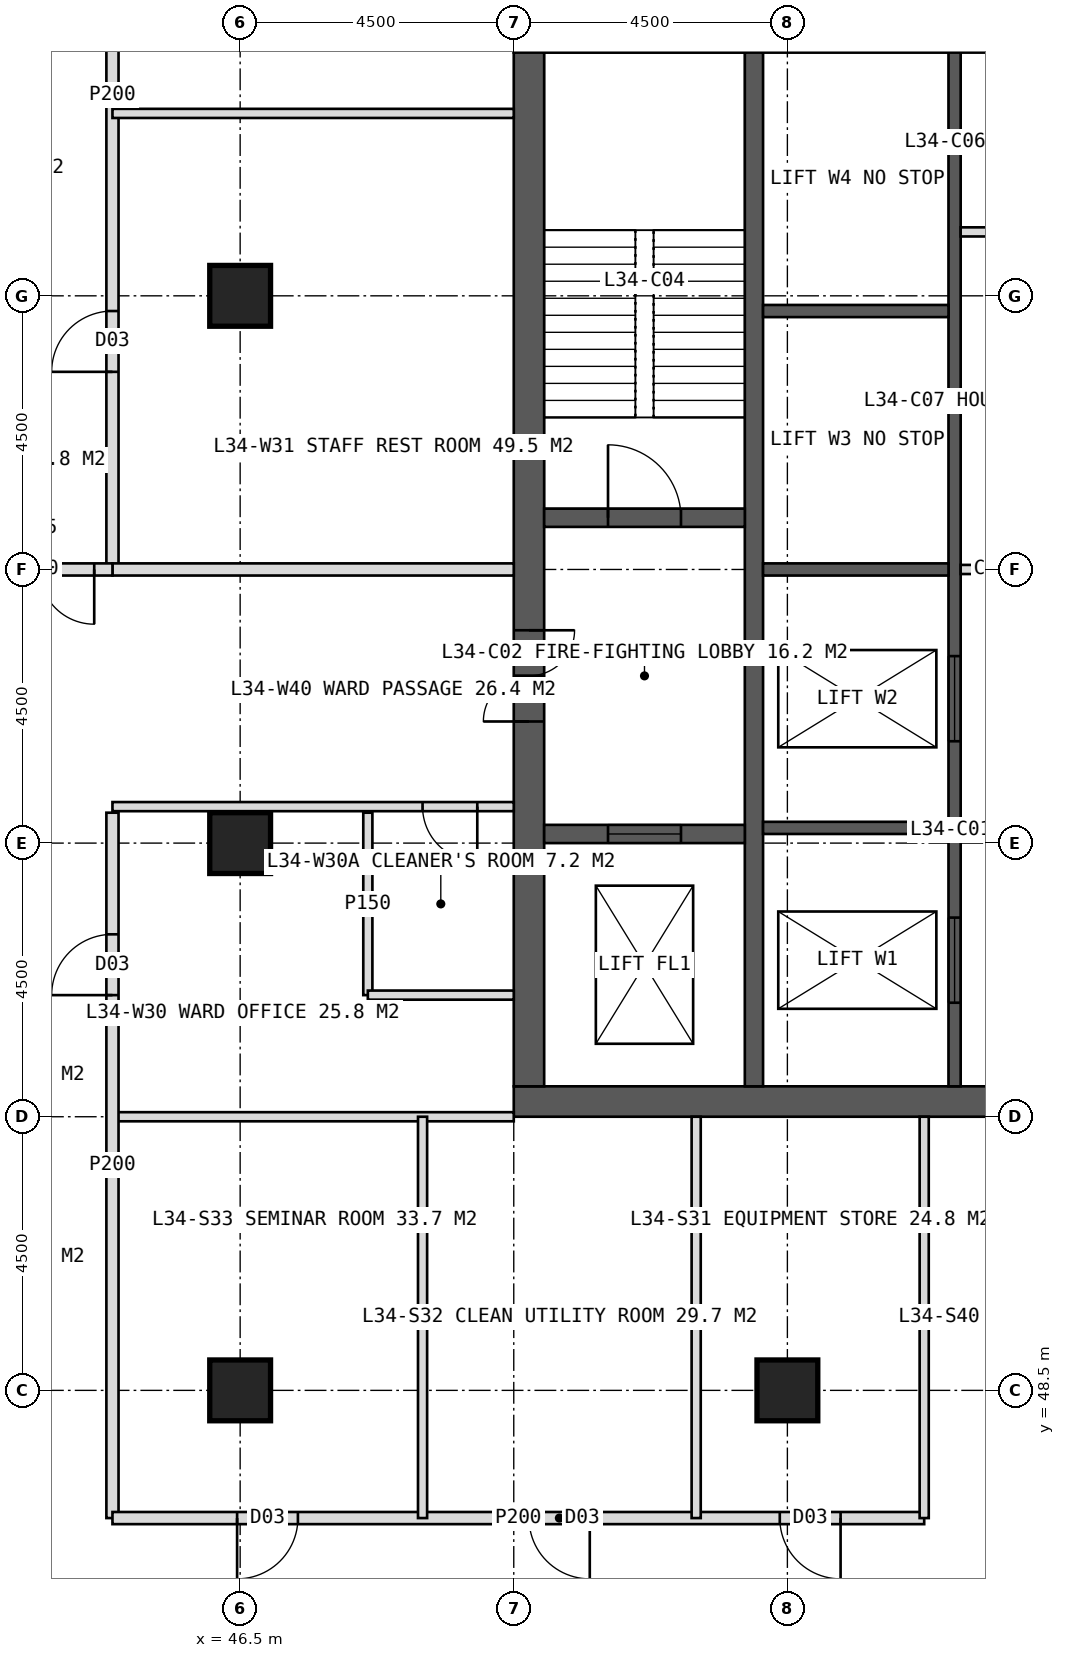
"""IFC4 building model, lengths in metres.
Left out: names, types, materials, properties, quantities, classifications, styles, units other than length and angle.
Written with IfcOpenShell. Run it as: python <this file> out.ifc"""

import sys

from ifc_helpers import new_model, si_unit, direction, frame, frame_2d, origin, origin_2d, place, context, subcontext, project, spatial, rectangle, hollow_rectangle, extrude, element, fill, save


model = new_model("IFC4")
c1 = context("Model", 3, precision=1e-05, world=origin(), true_north=direction((0.0, 1.0)))
c2 = subcontext(c1, "Body", "Model", "MODEL_VIEW")
j1 = project(units=[si_unit("LENGTHUNIT", "METRE"), si_unit("PLANEANGLEUNIT", "RADIAN")], contexts=[c1])
p1 = place(None, origin())
s1 = spatial("IfcSite", under=j1, at=p1, CompositionType="ELEMENT")
p2 = place(p1, origin())
s2 = spatial("IfcBuilding", under=s1, at=p2, CompositionType="ELEMENT")
p3 = place(p2, frame((0.0, 0.0, 144.0)))
s3 = spatial("IfcBuildingStorey", under=s2, at=p3, CompositionType="ELEMENT", Elevation=144.0)
p4 = place(p3, frame((51.0, 53.25, 0.0), z_axis=(0.0, 0.0, 1.0), x_axis=(1.0, 0.0, 0.0)))
e1 = element("IfcWall", 1, at=p4, inside=s3, PredefinedType="SHEAR", context=c2, shape_type="SweptSolid", body=[
    extrude(rectangle(XDim=18.0, YDim=0.5, at=frame_2d((9.0, 0.0))), origin(), (0.0, 0.0, 1.0), 4.0),
])
p5 = place(p4, frame((8.1, 0.0, 0.0)))
e2 = element("IfcOpeningElement", 2, at=p5, cuts=e1, PredefinedType="OPENING", context=c2, shape_type="SweptSolid", body=[
    extrude(rectangle(XDim=1.8, YDim=2.2, at=frame_2d((0.9, 1.1))), frame((0.0, 0.26, 0.0), z_axis=(0.0, -1.0, 0.0), x_axis=(1.0, 0.0, 0.0)), (0.0, 0.0, 1.0), 0.52),
])
p6 = place(p3, frame((51.25, 53.5, 0.0), z_axis=(0.0, 0.0, 1.0), x_axis=(0.0, 1.0, 0.0)))
e3 = element("IfcWall", 3, at=p6, inside=s3, PredefinedType="SHEAR", context=c2, shape_type="SweptSolid", body=[
    extrude(rectangle(XDim=17.0, YDim=0.5, at=frame_2d((8.5, 0.0))), origin(), (0.0, 0.0, 1.0), 4.0),
])
p7 = place(p6, frame((6.0, 0.0, 0.0)))
e4 = element("IfcOpeningElement", 4, at=p7, cuts=e3, PredefinedType="OPENING", context=c2, shape_type="SweptSolid", body=[
    extrude(rectangle(XDim=1.5, YDim=2.2, at=frame_2d((0.75, 1.1))), frame((0.0, 0.26, 0.0), z_axis=(0.0, -1.0, 0.0), x_axis=(1.0, 0.0, 0.0)), (0.0, 0.0, 1.0), 0.52),
])
p8 = place(p3, frame((54.95, 53.5, 0.0), z_axis=(0.0, 0.0, 1.0), x_axis=(0.0, 1.0, 0.0)))
e5 = element("IfcWall", 5, at=p8, inside=s3, PredefinedType="SHEAR", context=c2, shape_type="SweptSolid", body=[
    extrude(rectangle(XDim=17.0, YDim=0.3, at=frame_2d((8.5, 0.0))), origin(), (0.0, 0.0, 1.0), 4.0),
])
p9 = place(p3, frame((58.25, 53.5, 0.0), z_axis=(0.0, 0.0, 1.0), x_axis=(0.0, 1.0, 0.0)))
e6 = element("IfcWall", 6, at=p9, inside=s3, PredefinedType="SHEAR", context=c2, shape_type="SweptSolid", body=[
    extrude(rectangle(XDim=17.0, YDim=0.2, at=frame_2d((8.5, 0.0))), origin(), (0.0, 0.0, 1.0), 4.0),
])
p10 = place(p9, frame((1.375, 0.0, 0.0)))
e7 = element("IfcOpeningElement", 7, at=p10, cuts=e6, PredefinedType="OPENING", context=c2, shape_type="SweptSolid", body=[
    extrude(rectangle(XDim=1.4, YDim=2.2, at=frame_2d((0.7, 1.1))), frame((0.0, 0.11, 0.0), z_axis=(0.0, -1.0, 0.0), x_axis=(1.0, 0.0, 0.0)), (0.0, 0.0, 1.0), 0.22),
])
p11 = place(p9, frame((5.675, 0.0, 0.0)))
e8 = element("IfcOpeningElement", 8, at=p11, cuts=e6, PredefinedType="OPENING", context=c2, shape_type="SweptSolid", body=[
    extrude(rectangle(XDim=1.4, YDim=2.2, at=frame_2d((0.7, 1.1))), frame((0.0, 0.11, 0.0), z_axis=(0.0, -1.0, 0.0), x_axis=(1.0, 0.0, 0.0)), (0.0, 0.0, 1.0), 0.22),
])
for number, where, z_axis, x_axis in (
    (9, (55.1, 57.75, 0.0), (0.0, 0.0, 1.0), (1.0, 0.0, 0.0)),
    (10, (55.1, 62.0, 0.0), (0.0, 0.0, 1.0), (1.0, 0.0, 0.0)),
    (11, (55.1, 66.25, 0.0), (0.0, 0.0, 1.0), (1.0, 0.0, 0.0)),
):
    element("IfcWall", number, at=place(p3, frame(where, z_axis=z_axis, x_axis=x_axis)), inside=s3, PredefinedType="SHEAR", context=c2, shape_type="SweptSolid", body=[
        extrude(rectangle(XDim=3.05, YDim=0.2, at=frame_2d((1.525, 0.0))), origin(), (0.0, 0.0, 1.0), 4.0),
    ])
p12 = place(p3, frame((51.5, 62.85, 0.0), z_axis=(0.0, 0.0, 1.0), x_axis=(1.0, 0.0, 0.0)))
e12 = element("IfcWall", 12, at=p12, inside=s3, PredefinedType="SHEAR", context=c2, shape_type="SweptSolid", body=[
    extrude(rectangle(XDim=3.3, YDim=0.3, at=frame_2d((1.65, 0.0))), origin(), (0.0, 0.0, 1.0), 4.0),
])
p13 = place(p12, frame((1.05, 0.0, 0.0)))
e13 = element("IfcOpeningElement", 13, at=p13, cuts=e12, PredefinedType="OPENING", context=c2, shape_type="SweptSolid", body=[
    extrude(rectangle(XDim=1.2, YDim=2.1, at=frame_2d((0.6, 1.05))), frame((0.0, 0.16, 0.0), z_axis=(0.0, -1.0, 0.0), x_axis=(1.0, 0.0, 0.0)), (0.0, 0.0, 1.0), 0.32),
])
p14 = place(p3, frame((51.5, 57.65, 0.0), z_axis=(0.0, 0.0, 1.0), x_axis=(1.0, 0.0, 0.0)))
e14 = element("IfcWall", 14, at=p14, inside=s3, PredefinedType="SHEAR", context=c2, shape_type="SweptSolid", body=[
    extrude(rectangle(XDim=3.3, YDim=0.3, at=frame_2d((1.65, 0.0))), origin(), (0.0, 0.0, 1.0), 4.0),
])
p15 = place(p14, frame((1.05, 0.0, 0.0)))
e15 = element("IfcOpeningElement", 15, at=p15, cuts=e14, PredefinedType="OPENING", context=c2, shape_type="SweptSolid", body=[
    extrude(rectangle(XDim=1.2, YDim=2.2, at=frame_2d((0.6, 1.1))), frame((0.0, 0.16, 0.0), z_axis=(0.0, -1.0, 0.0), x_axis=(1.0, 0.0, 0.0)), (0.0, 0.0, 1.0), 0.32),
])
for number, where, z_axis, x_axis in (
    (16, (46.5, 48.5, 0.0), (0.0, 0.0, 1.0), (1.0, 0.0, 0.0)),
    (17, (55.5, 48.5, 0.0), (0.0, 0.0, 1.0), (1.0, 0.0, 0.0)),
    (18, (46.5, 57.5, 0.0), (0.0, 0.0, 1.0), (1.0, 0.0, 0.0)),
    (19, (46.5, 66.5, 0.0), (0.0, 0.0, 1.0), (1.0, 0.0, 0.0)),
):
    element("IfcColumn", number, at=place(p3, frame(where, z_axis=z_axis, x_axis=x_axis)), inside=s3, PredefinedType="COLUMN", context=c2, shape_type="SweptSolid", body=[
        extrude(hollow_rectangle(XDim=1.0, YDim=1.0, WallThickness=0.1, at=origin_2d()), origin(), (0.0, 0.0, 1.0), 4.0),
    ])
p16 = place(p3, frame((51.0, 53.0, 0.0), z_axis=(0.0, 0.0, 1.0), x_axis=(-1.0, 0.0, 0.0)))
e20 = element("IfcWall", 20, at=p16, inside=s3, PredefinedType="PARTITIONING", context=c2, shape_type="SweptSolid", body=[
    extrude(rectangle(XDim=6.6, YDim=0.15, at=frame_2d((3.3, 0.0))), origin(), (0.0, 0.0, 1.0), 3.75),
])
p17 = place(p3, frame((44.4, 46.4, 0.0), z_axis=(0.0, 0.0, 1.0), x_axis=(0.0, 1.0, 0.0)))
e21 = element("IfcWall", 21, at=p17, inside=s3, PredefinedType="PARTITIONING", context=c2, shape_type="SweptSolid", body=[
    extrude(rectangle(XDim=11.6, YDim=0.2, at=frame_2d((5.8, 0.0))), origin(), (0.0, 0.0, 1.0), 3.75),
])
p18 = place(p17, frame((8.6, 0.0, 0.0)))
e22 = element("IfcOpeningElement", 22, at=p18, cuts=e21, PredefinedType="OPENING", context=c2, shape_type="SweptSolid", body=[
    extrude(rectangle(XDim=1.0, YDim=2.1, at=frame_2d((0.5, 1.05))), frame((0.0, 0.11, 0.0), z_axis=(0.0, -1.0, 0.0), x_axis=(1.0, 0.0, 0.0)), (0.0, 0.0, 1.0), 0.22),
])
p19 = place(p3, frame((44.4, 62.0, 0.0), z_axis=(0.0, 0.0, 1.0), x_axis=(0.0, 1.0, 0.0)))
e23 = element("IfcWall", 23, at=p19, inside=s3, PredefinedType="PARTITIONING", context=c2, shape_type="SweptSolid", body=[
    extrude(rectangle(XDim=15.6, YDim=0.2, at=frame_2d((7.8, 0.0))), origin(), (0.0, 0.0, 1.0), 3.75),
])
p20 = place(p19, frame((3.25, 0.0, 0.0)))
e24 = element("IfcOpeningElement", 24, at=p20, cuts=e23, PredefinedType="OPENING", context=c2, shape_type="SweptSolid", body=[
    extrude(rectangle(XDim=1.0, YDim=2.1, at=frame_2d((0.5, 1.05))), frame((0.0, 0.11, 0.0), z_axis=(0.0, -1.0, 0.0), x_axis=(1.0, 0.0, 0.0)), (0.0, 0.0, 1.0), 0.22),
])
p21 = place(p19, frame((9.25, 0.0, 0.0)))
e25 = element("IfcOpeningElement", 25, at=p21, cuts=e23, PredefinedType="OPENING", context=c2, shape_type="SweptSolid", body=[
    extrude(rectangle(XDim=1.0, YDim=2.1, at=frame_2d((0.5, 1.05))), frame((0.0, 0.11, 0.0), z_axis=(0.0, -1.0, 0.0), x_axis=(1.0, 0.0, 0.0)), (0.0, 0.0, 1.0), 0.22),
])
p22 = place(p19, frame((13.3, 0.0, 0.0)))
e26 = element("IfcOpeningElement", 26, at=p22, cuts=e23, PredefinedType="OPENING", context=c2, shape_type="SweptSolid", body=[
    extrude(rectangle(XDim=1.0, YDim=2.1, at=frame_2d((0.5, 1.05))), frame((0.0, 0.11, 0.0), z_axis=(0.0, -1.0, 0.0), x_axis=(1.0, 0.0, 0.0)), (0.0, 0.0, 1.0), 0.22),
])
p23 = place(p3, frame((51.0, 58.1, 0.0), z_axis=(0.0, 0.0, 1.0), x_axis=(-1.0, 0.0, 0.0)))
e27 = element("IfcWall", 27, at=p23, inside=s3, PredefinedType="PARTITIONING", context=c2, shape_type="SweptSolid", body=[
    extrude(rectangle(XDim=6.6, YDim=0.15, at=frame_2d((3.3, 0.0))), origin(), (0.0, 0.0, 1.0), 3.75),
])
p24 = place(p23, frame((0.6, 0.0, 0.0)))
e28 = element("IfcOpeningElement", 28, at=p24, cuts=e27, PredefinedType="OPENING", context=c2, shape_type="SweptSolid", body=[
    extrude(rectangle(XDim=0.9, YDim=2.1, at=frame_2d((0.45, 1.05))), frame((0.0, 0.085, 0.0), z_axis=(0.0, -1.0, 0.0), x_axis=(1.0, 0.0, 0.0)), (0.0, 0.0, 1.0), 0.17),
])
p25 = place(p3, frame((51.0, 62.0, 0.0), z_axis=(0.0, 0.0, 1.0), x_axis=(-1.0, 0.0, 0.0)))
e29 = element("IfcWall", 29, at=p25, inside=s3, PredefinedType="SOLIDWALL", context=c2, shape_type="SweptSolid", body=[
    extrude(rectangle(XDim=6.6, YDim=0.2, at=frame_2d((3.3, 0.0))), origin(), (0.0, 0.0, 1.0), 2.95),
])
p26 = place(p3, frame((51.0, 69.5, 0.0), z_axis=(0.0, 0.0, 1.0), x_axis=(-1.0, 0.0, 0.0)))
e30 = element("IfcWall", 30, at=p26, inside=s3, PredefinedType="PARTITIONING", context=c2, shape_type="SweptSolid", body=[
    extrude(rectangle(XDim=6.6, YDim=0.15, at=frame_2d((3.3, 0.0))), origin(), (0.0, 0.0, 1.0), 3.75),
])
p27 = place(p3, frame((48.6, 55.0, 0.0), z_axis=(0.0, 0.0, 1.0), x_axis=(0.0, 1.0, 0.0)))
e31 = element("IfcWall", 31, at=p27, inside=s3, PredefinedType="PARTITIONING", context=c2, shape_type="SweptSolid", body=[
    extrude(rectangle(XDim=3.0, YDim=0.15, at=frame_2d((1.5, 0.0))), origin(), (0.0, 0.0, 1.0), 3.75),
])
p28 = place(p3, frame((51.0, 55.0, 0.0), z_axis=(0.0, 0.0, 1.0), x_axis=(-1.0, 0.0, 0.0)))
e32 = element("IfcWall", 32, at=p28, inside=s3, PredefinedType="PARTITIONING", context=c2, shape_type="SweptSolid", body=[
    extrude(rectangle(XDim=2.4, YDim=0.15, at=frame_2d((1.2, 0.0))), origin(), (0.0, 0.0, 1.0), 3.75),
])
p29 = place(p3, frame((57.75, 46.4, 0.0), z_axis=(0.0, 0.0, 1.0), x_axis=(-1.0, 0.0, 0.0)))
e33 = element("IfcWall", 33, at=p29, inside=s3, PredefinedType="PARTITIONING", context=c2, shape_type="SweptSolid", body=[
    extrude(rectangle(XDim=13.35, YDim=0.2, at=frame_2d((6.675, 0.0))), origin(), (0.0, 0.0, 1.0), 3.75),
])
p30 = place(p29, frame((1.375, 0.0, 0.0)))
e34 = element("IfcOpeningElement", 34, at=p30, cuts=e33, PredefinedType="OPENING", context=c2, shape_type="SweptSolid", body=[
    extrude(rectangle(XDim=1.0, YDim=2.1, at=frame_2d((0.5, 1.05))), frame((0.0, 0.11, 0.0), z_axis=(0.0, -1.0, 0.0), x_axis=(1.0, 0.0, 0.0)), (0.0, 0.0, 1.0), 0.22),
])
p31 = place(p29, frame((5.5, 0.0, 0.0)))
e35 = element("IfcOpeningElement", 35, at=p31, cuts=e33, PredefinedType="OPENING", context=c2, shape_type="SweptSolid", body=[
    extrude(rectangle(XDim=1.0, YDim=2.1, at=frame_2d((0.5, 1.05))), frame((0.0, 0.11, 0.0), z_axis=(0.0, -1.0, 0.0), x_axis=(1.0, 0.0, 0.0)), (0.0, 0.0, 1.0), 0.22),
])
p32 = place(p29, frame((10.3, 0.0, 0.0)))
e36 = element("IfcOpeningElement", 36, at=p32, cuts=e33, PredefinedType="OPENING", context=c2, shape_type="SweptSolid", body=[
    extrude(rectangle(XDim=1.0, YDim=2.1, at=frame_2d((0.5, 1.05))), frame((0.0, 0.11, 0.0), z_axis=(0.0, -1.0, 0.0), x_axis=(1.0, 0.0, 0.0)), (0.0, 0.0, 1.0), 0.22),
])
for number, where, z_axis, x_axis in (
    (37, (57.75, 53.0, 0.0), (0.0, 0.0, 1.0), (0.0, -1.0, 0.0)),
    (38, (54.0, 53.0, 0.0), (0.0, 0.0, 1.0), (0.0, -1.0, 0.0)),
    (39, (49.5, 53.0, 0.0), (0.0, 0.0, 1.0), (0.0, -1.0, 0.0)),
):
    element("IfcWall", number, at=place(p3, frame(where, z_axis=z_axis, x_axis=x_axis)), inside=s3, PredefinedType="PARTITIONING", context=c2, shape_type="SweptSolid", body=[
        extrude(rectangle(XDim=6.6, YDim=0.15, at=frame_2d((3.3, 0.0))), origin(), (0.0, 0.0, 1.0), 3.75),
    ])
p33 = place(p3, frame((44.4, 62.0, 0.0), z_axis=(0.0, 0.0, 1.0), x_axis=(-1.0, 0.0, 0.0)))
e40 = element("IfcWall", 40, at=p33, inside=s3, PredefinedType="SOLIDWALL", context=c2, shape_type="SweptSolid", body=[
    extrude(rectangle(XDim=2.7, YDim=0.2, at=frame_2d((1.35, 0.0))), origin(), (0.0, 0.0, 1.0), 2.95),
])
p34 = place(p33, frame((0.3, 0.0, 0.0)))
e41 = element("IfcOpeningElement", 41, at=p34, cuts=e40, PredefinedType="OPENING", context=c2, shape_type="SweptSolid", body=[
    extrude(rectangle(XDim=1.8, YDim=2.2, at=frame_2d((0.9, 1.1))), frame((0.0, 0.11, 0.0), z_axis=(0.0, -1.0, 0.0), x_axis=(1.0, 0.0, 0.0)), (0.0, 0.0, 1.0), 0.22),
])
p35 = place(p3, frame((58.35, 62.0, 0.0), z_axis=(0.0, 0.0, 1.0), x_axis=(1.0, 0.0, 0.0)))
e42 = element("IfcWall", 42, at=p35, inside=s3, PredefinedType="PARTITIONING", context=c2, shape_type="SweptSolid", body=[
    extrude(rectangle(XDim=3.3, YDim=0.15, at=frame_2d((1.65, 0.0))), origin(), (0.0, 0.0, 1.0), 3.75),
])
p36 = place(p35, frame((1.15, 0.0, 0.0)))
e43 = element("IfcOpeningElement", 43, at=p36, cuts=e42, PredefinedType="OPENING", context=c2, shape_type="SweptSolid", body=[
    extrude(rectangle(XDim=1.0, YDim=2.1, at=frame_2d((0.5, 1.05))), frame((0.0, 0.085, 0.0), z_axis=(0.0, -1.0, 0.0), x_axis=(1.0, 0.0, 0.0)), (0.0, 0.0, 1.0), 0.17),
])
p37 = place(p3, frame((58.35, 67.551, 0.0), z_axis=(0.0, 0.0, 1.0), x_axis=(1.0, 0.0, 0.0)))
e44 = element("IfcWall", 44, at=p37, inside=s3, PredefinedType="PARTITIONING", context=c2, shape_type="SweptSolid", body=[
    extrude(rectangle(XDim=3.3, YDim=0.15, at=frame_2d((1.65, 0.0))), origin(), (0.0, 0.0, 1.0), 3.75),
])
p38 = place(p24, origin())
e45 = element("IfcDoor", 45, at=p38, inside=s3, OperationType="SINGLE_SWING_LEFT", PredefinedType="DOOR", context=c2, shape_type="SweptSolid", body=[
    extrude(rectangle(XDim=0.9, YDim=2.1, at=frame_2d((0.45, 1.05))), frame((0.0, 0.025, 0.0), z_axis=(0.0, -1.0, 0.0), x_axis=(1.0, 0.0, 0.0)), (0.0, 0.0, 1.0), 0.05),
])
fill(e28, e45)
p39 = place(p18, origin())
e46 = element("IfcDoor", 46, at=p39, inside=s3, OperationType="SINGLE_SWING_LEFT", PredefinedType="DOOR", context=c2, shape_type="SweptSolid", body=[
    extrude(rectangle(XDim=1.0, YDim=2.1, at=frame_2d((0.5, 1.05))), frame((0.0, 0.025, 0.0), z_axis=(0.0, -1.0, 0.0), x_axis=(1.0, 0.0, 0.0)), (0.0, 0.0, 1.0), 0.05),
])
fill(e22, e46)
p40 = place(p20, origin())
e47 = element("IfcDoor", 47, at=p40, inside=s3, OperationType="SINGLE_SWING_LEFT", PredefinedType="DOOR", context=c2, shape_type="SweptSolid", body=[
    extrude(rectangle(XDim=1.0, YDim=2.1, at=frame_2d((0.5, 1.05))), frame((0.0, 0.025, 0.0), z_axis=(0.0, -1.0, 0.0), x_axis=(1.0, 0.0, 0.0)), (0.0, 0.0, 1.0), 0.05),
])
fill(e24, e47)
p41 = place(p30, origin())
e48 = element("IfcDoor", 48, at=p41, inside=s3, OperationType="SINGLE_SWING_LEFT", PredefinedType="DOOR", context=c2, shape_type="SweptSolid", body=[
    extrude(rectangle(XDim=1.0, YDim=2.1, at=frame_2d((0.5, 1.05))), frame((0.0, 0.025, 0.0), z_axis=(0.0, -1.0, 0.0), x_axis=(1.0, 0.0, 0.0)), (0.0, 0.0, 1.0), 0.05),
])
fill(e34, e48)
p42 = place(p31, origin())
e49 = element("IfcDoor", 49, at=p42, inside=s3, OperationType="SINGLE_SWING_LEFT", PredefinedType="DOOR", context=c2, shape_type="SweptSolid", body=[
    extrude(rectangle(XDim=1.0, YDim=2.1, at=frame_2d((0.5, 1.05))), frame((0.0, 0.025, 0.0), z_axis=(0.0, -1.0, 0.0), x_axis=(1.0, 0.0, 0.0)), (0.0, 0.0, 1.0), 0.05),
])
fill(e35, e49)
p43 = place(p32, origin())
e50 = element("IfcDoor", 50, at=p43, inside=s3, OperationType="SINGLE_SWING_RIGHT", PredefinedType="DOOR", context=c2, shape_type="SweptSolid", body=[
    extrude(rectangle(XDim=1.0, YDim=2.1, at=frame_2d((0.5, 1.05))), frame((0.0, 0.025, 0.0), z_axis=(0.0, -1.0, 0.0), x_axis=(1.0, 0.0, 0.0)), (0.0, 0.0, 1.0), 0.05),
])
fill(e36, e50)
p44 = place(p34, origin())
e51 = element("IfcDoor", 51, at=p44, inside=s3, OperationType="DOUBLE_DOOR_DOUBLE_SWING", PredefinedType="DOOR", context=c2, shape_type="SweptSolid", body=[
    extrude(rectangle(XDim=1.8, YDim=2.2, at=frame_2d((0.9, 1.1))), frame((0.0, 0.025, 0.0), z_axis=(0.0, -1.0, 0.0), x_axis=(1.0, 0.0, 0.0)), (0.0, 0.0, 1.0), 0.05),
])
fill(e41, e51)
p45 = place(p7, origin())
e52 = element("IfcDoor", 52, at=p45, inside=s3, OperationType="DOUBLE_DOOR_SINGLE_SWING", PredefinedType="DOOR", context=c2, shape_type="SweptSolid", body=[
    extrude(rectangle(XDim=1.5, YDim=2.2, at=frame_2d((0.75, 1.1))), frame((0.0, 0.025, 0.0), z_axis=(0.0, -1.0, 0.0), x_axis=(1.0, 0.0, 0.0)), (0.0, 0.0, 1.0), 0.05),
])
fill(e4, e52)
p46 = place(p13, origin())
e53 = element("IfcDoor", 53, at=p46, inside=s3, OperationType="SINGLE_SWING_LEFT", PredefinedType="DOOR", context=c2, shape_type="SweptSolid", body=[
    extrude(rectangle(XDim=1.2, YDim=2.1, at=frame_2d((0.6, 1.05))), frame((0.0, 0.025, 0.0), z_axis=(0.0, -1.0, 0.0), x_axis=(1.0, 0.0, 0.0)), (0.0, 0.0, 1.0), 0.05),
])
fill(e13, e53)
p47 = place(p15, origin())
e54 = element("IfcDoor", 54, at=p47, inside=s3, OperationType="SLIDING_TO_LEFT", PredefinedType="DOOR", context=c2, shape_type="SweptSolid", body=[
    extrude(rectangle(XDim=1.2, YDim=2.2, at=frame_2d((0.6, 1.1))), frame((0.0, 0.025, 0.0), z_axis=(0.0, -1.0, 0.0), x_axis=(1.0, 0.0, 0.0)), (0.0, 0.0, 1.0), 0.05),
])
fill(e15, e54)
p48 = place(p10, origin())
e55 = element("IfcDoor", 55, at=p48, inside=s3, OperationType="SLIDING_TO_LEFT", PredefinedType="DOOR", context=c2, shape_type="SweptSolid", body=[
    extrude(rectangle(XDim=1.4, YDim=2.2, at=frame_2d((0.7, 1.1))), frame((0.0, 0.025, 0.0), z_axis=(0.0, -1.0, 0.0), x_axis=(1.0, 0.0, 0.0)), (0.0, 0.0, 1.0), 0.05),
])
fill(e7, e55)
p49 = place(p11, origin())
e56 = element("IfcDoor", 56, at=p49, inside=s3, OperationType="SLIDING_TO_LEFT", PredefinedType="DOOR", context=c2, shape_type="SweptSolid", body=[
    extrude(rectangle(XDim=1.4, YDim=2.2, at=frame_2d((0.7, 1.1))), frame((0.0, 0.025, 0.0), z_axis=(0.0, -1.0, 0.0), x_axis=(1.0, 0.0, 0.0)), (0.0, 0.0, 1.0), 0.05),
])
fill(e8, e56)
save(model, sys.argv[1])
